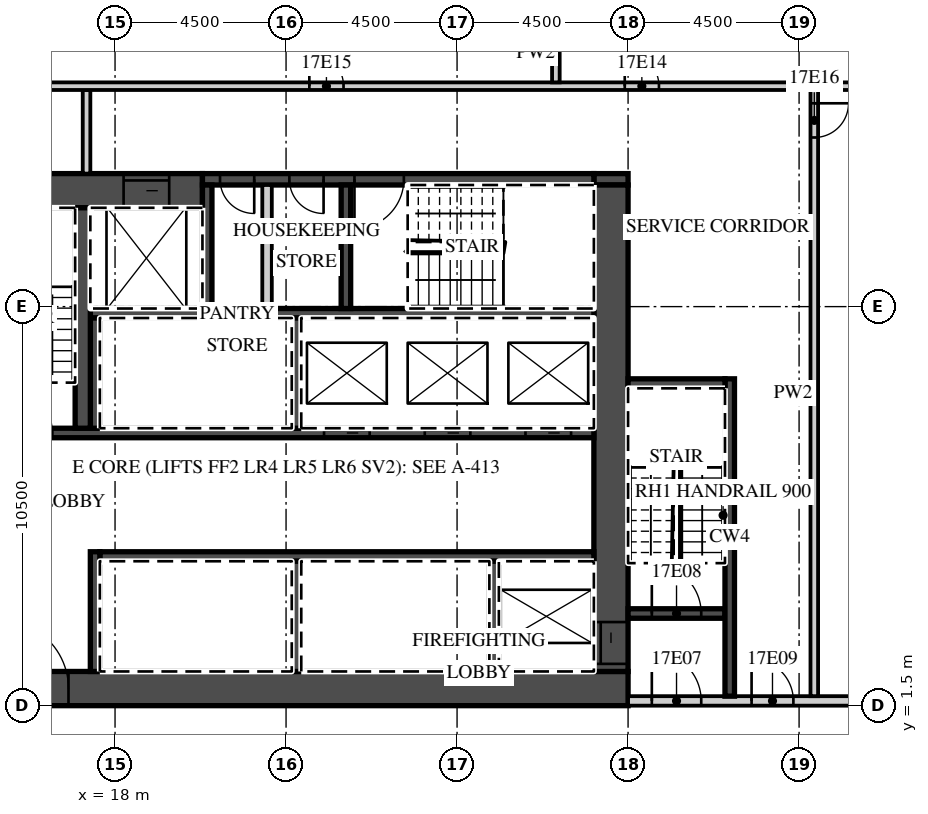
"""IFC4 building model, lengths in metres.
Left out: names, types, materials, properties, quantities, classifications, styles, units other than length and angle.
Written with IfcOpenShell. Run it as: python <this file> out.ifc"""

import sys

from ifc_helpers import new_model, si_unit, direction, frame, frame_2d, origin, place, context, subcontext, project, spatial, rectangle, extrude, element, fill, save


model = new_model("IFC4")
c1 = context("Model", 3, precision=1e-05, world=origin(), true_north=direction((0.0, 1.0)))
c2 = subcontext(c1, "Body", "Model", "MODEL_VIEW")
j1 = project(units=[si_unit("LENGTHUNIT", "METRE"), si_unit("PLANEANGLEUNIT", "RADIAN")], contexts=[c1])
p1 = place(None, origin())
s1 = spatial("IfcSite", under=j1, at=p1, CompositionType="ELEMENT")
p2 = place(p1, origin())
s2 = spatial("IfcBuilding", under=s1, at=p2, CompositionType="ELEMENT")
p3 = place(p2, frame((0.0, 0.0, 86.4)))
s3 = spatial("IfcBuildingStorey", under=s2, at=p3, CompositionType="ELEMENT", Elevation=86.4)
p4 = place(p3, frame((13.5, 1.95, 0.0), z_axis=(0.0, 0.0, 1.0), x_axis=(1.0, 0.0, 0.0)))
e1 = element("IfcWall", 1, at=p4, inside=s3, PredefinedType="SHEAR", context=c2, shape_type="SweptSolid", body=[
    extrude(rectangle(XDim=18.0, YDim=0.9, at=frame_2d((9.0, 0.0))), origin(), (0.0, 0.0, 1.0), 3.02),
])
p5 = place(p4, frame((1.475, 0.0, 0.0)))
e2 = element("IfcOpeningElement", 2, at=p5, cuts=e1, PredefinedType="OPENING", context=c2, shape_type="SweptSolid", body=[
    extrude(rectangle(XDim=1.8, YDim=2.1, at=frame_2d((0.9, 1.05))), frame((0.0, 0.46, 0.0), z_axis=(0.0, -1.0, 0.0), x_axis=(1.0, 0.0, 0.0)), (0.0, 0.0, 1.0), 0.92),
])
p6 = place(p3, frame((13.5, 15.05, 0.0), z_axis=(0.0, 0.0, 1.0), x_axis=(1.0, 0.0, 0.0)))
e3 = element("IfcWall", 3, at=p6, inside=s3, PredefinedType="SHEAR", context=c2, shape_type="SweptSolid", body=[
    extrude(rectangle(XDim=6.8, YDim=0.9, at=frame_2d((3.4, 0.0))), origin(), (0.0, 0.0, 1.0), 3.02),
])
p7 = place(p6, frame((4.725, 0.0, 0.0)))
e4 = element("IfcOpeningElement", 4, at=p7, cuts=e3, PredefinedType="OPENING", context=c2, shape_type="SweptSolid", body=[
    extrude(rectangle(XDim=1.2, YDim=2.1, at=frame_2d((0.6, 1.05))), frame((0.0, 0.46, 0.0), z_axis=(0.0, -1.0, 0.0), x_axis=(1.0, 0.0, 0.0)), (0.0, 0.0, 1.0), 0.92),
])
p8 = place(p3, frame((30.6, 15.35, 0.0), z_axis=(0.0, 0.0, 1.0), x_axis=(1.0, 0.0, 0.0)))
e5 = element("IfcWall", 5, at=p8, inside=s3, PredefinedType="SHEAR", context=c2, shape_type="SweptSolid", body=[
    extrude(rectangle(XDim=0.9, YDim=0.3, at=frame_2d((0.45, 0.0))), origin(), (0.0, 0.0, 1.0), 3.02),
])
p9 = place(p3, frame((20.3, 15.35, 0.0), z_axis=(0.0, 0.0, 1.0), x_axis=(1.0, 0.0, 0.0)))
e6 = element("IfcWall", 6, at=p9, inside=s3, PredefinedType="SHEAR", context=c2, shape_type="SweptSolid", body=[
    extrude(rectangle(XDim=10.3, YDim=0.3, at=frame_2d((5.15, 0.0))), origin(), (0.0, 0.0, 1.0), 3.02),
])
p10 = place(p9, frame((4.0, 0.0, 0.0)))
e7 = element("IfcOpeningElement", 7, at=p10, cuts=e6, PredefinedType="OPENING", context=c2, shape_type="SweptSolid", body=[
    extrude(rectangle(XDim=1.3, YDim=2.1, at=frame_2d((0.65, 1.05))), frame((0.0, 0.16, 0.0), z_axis=(0.0, -1.0, 0.0), x_axis=(1.0, 0.0, 0.0)), (0.0, 0.0, 1.0), 0.32),
])
p11 = place(p9, frame((2.288, 0.0, 0.0)))
e8 = element("IfcOpeningElement", 8, at=p11, cuts=e6, PredefinedType="OPENING", context=c2, shape_type="SweptSolid", body=[
    extrude(rectangle(XDim=0.9, YDim=2.1, at=frame_2d((0.45, 1.05))), frame((0.0, 0.16, 0.0), z_axis=(0.0, -1.0, 0.0), x_axis=(1.0, 0.0, 0.0)), (0.0, 0.0, 1.0), 0.32),
])
p12 = place(p9, frame((0.462, 0.0, 0.0)))
e9 = element("IfcOpeningElement", 9, at=p12, cuts=e6, PredefinedType="OPENING", context=c2, shape_type="SweptSolid", body=[
    extrude(rectangle(XDim=0.9, YDim=2.1, at=frame_2d((0.45, 1.05))), frame((0.0, 0.16, 0.0), z_axis=(0.0, -1.0, 0.0), x_axis=(1.0, 0.0, 0.0)), (0.0, 0.0, 1.0), 0.32),
])
p13 = place(p3, frame((31.05, 2.4, 0.0), z_axis=(0.0, 0.0, 1.0), x_axis=(0.0, 1.0, 0.0)))
e10 = element("IfcWall", 10, at=p13, inside=s3, PredefinedType="SHEAR", context=c2, shape_type="SweptSolid", body=[
    extrude(rectangle(XDim=12.8, YDim=0.9, at=frame_2d((6.4, 0.0))), origin(), (0.0, 0.0, 1.0), 3.02),
])
p14 = place(p13, frame((0.2, 0.0, 0.0)))
e11 = element("IfcOpeningElement", 11, at=p14, cuts=e10, PredefinedType="OPENING", context=c2, shape_type="SweptSolid", body=[
    extrude(rectangle(XDim=1.1, YDim=2.1, at=frame_2d((0.55, 1.05))), frame((0.0, 0.46, 0.0), z_axis=(0.0, -1.0, 0.0), x_axis=(1.0, 0.0, 0.0)), (0.0, 0.0, 1.0), 0.92),
])
p15 = place(p3, frame((17.6, 5.425, 0.0), z_axis=(0.0, 0.0, 1.0), x_axis=(1.0, 0.0, 0.0)))
e12 = element("IfcWall", 12, at=p15, inside=s3, PredefinedType="SHEAR", context=c2, shape_type="SweptSolid", body=[
    extrude(rectangle(XDim=13.0, YDim=0.25, at=frame_2d((6.5, 0.0))), origin(), (0.0, 0.0, 1.0), 3.02),
])
p16 = place(p3, frame((17.475, 2.4, 0.0), z_axis=(0.0, 0.0, 1.0), x_axis=(0.0, 1.0, 0.0)))
e13 = element("IfcWall", 13, at=p16, inside=s3, PredefinedType="SHEAR", context=c2, shape_type="SweptSolid", body=[
    extrude(rectangle(XDim=3.15, YDim=0.25, at=frame_2d((1.575, 0.0))), origin(), (0.0, 0.0, 1.0), 3.02),
])
for number, where, z_axis, x_axis in (
    (14, (27.975, 2.4, 0.0), (0.0, 0.0, 1.0), (0.0, 1.0, 0.0)),
    (15, (22.775, 2.4, 0.0), (0.0, 0.0, 1.0), (0.0, 1.0, 0.0)),
):
    element("IfcWall", number, at=place(p3, frame(where, z_axis=z_axis, x_axis=x_axis)), inside=s3, PredefinedType="SHEAR", context=c2, shape_type="SweptSolid", body=[
        extrude(rectangle(XDim=2.9, YDim=0.25, at=frame_2d((1.45, 0.0))), origin(), (0.0, 0.0, 1.0), 3.02),
    ])
p17 = place(p3, frame((14.4, 8.675, 0.0), z_axis=(0.0, 0.0, 1.0), x_axis=(1.0, 0.0, 0.0)))
e16 = element("IfcWall", 16, at=p17, inside=s3, PredefinedType="SHEAR", context=c2, shape_type="SweptSolid", body=[
    extrude(rectangle(XDim=16.2, YDim=0.25, at=frame_2d((8.1, 0.0))), origin(), (0.0, 0.0, 1.0), 3.02),
])
p18 = place(p17, frame((14.4, 0.0, 0.0)))
e17 = element("IfcOpeningElement", 17, at=p18, cuts=e16, PredefinedType="OPENING", context=c2, shape_type="SweptSolid", body=[
    extrude(rectangle(XDim=1.2, YDim=2.1, at=frame_2d((0.6, 1.05))), frame((0.0, 0.135, 0.0), z_axis=(0.0, -1.0, 0.0), x_axis=(1.0, 0.0, 0.0)), (0.0, 0.0, 1.0), 0.27),
])
p19 = place(p17, frame((11.75, 0.0, 0.0)))
e18 = element("IfcOpeningElement", 18, at=p19, cuts=e16, PredefinedType="OPENING", context=c2, shape_type="SweptSolid", body=[
    extrude(rectangle(XDim=1.2, YDim=2.1, at=frame_2d((0.6, 1.05))), frame((0.0, 0.135, 0.0), z_axis=(0.0, -1.0, 0.0), x_axis=(1.0, 0.0, 0.0)), (0.0, 0.0, 1.0), 0.27),
])
p20 = place(p17, frame((9.1, 0.0, 0.0)))
e19 = element("IfcOpeningElement", 19, at=p20, cuts=e16, PredefinedType="OPENING", context=c2, shape_type="SweptSolid", body=[
    extrude(rectangle(XDim=1.2, YDim=2.1, at=frame_2d((0.6, 1.05))), frame((0.0, 0.135, 0.0), z_axis=(0.0, -1.0, 0.0), x_axis=(1.0, 0.0, 0.0)), (0.0, 0.0, 1.0), 0.27),
])
p21 = place(p17, frame((0.65, 0.0, 0.0)))
e20 = element("IfcOpeningElement", 20, at=p21, cuts=e16, PredefinedType="OPENING", context=c2, shape_type="SweptSolid", body=[
    extrude(rectangle(XDim=1.3, YDim=2.1, at=frame_2d((0.65, 1.05))), frame((0.0, 0.135, 0.0), z_axis=(0.0, -1.0, 0.0), x_axis=(1.0, 0.0, 0.0)), (0.0, 0.0, 1.0), 0.27),
])
p22 = place(p3, frame((17.35, 11.825, 0.0), z_axis=(0.0, 0.0, 1.0), x_axis=(1.0, 0.0, 0.0)))
e21 = element("IfcWall", 21, at=p22, inside=s3, PredefinedType="SHEAR", context=c2, shape_type="SweptSolid", body=[
    extrude(rectangle(XDim=13.25, YDim=0.25, at=frame_2d((6.625, 0.0))), origin(), (0.0, 0.0, 1.0), 3.02),
])
for number, where, z_axis, x_axis in (
    (22, (17.475, 8.8, 0.0), (0.0, 0.0, 1.0), (0.0, 1.0, 0.0)),
    (23, (22.775, 8.8, 0.0), (0.0, 0.0, 1.0), (0.0, 1.0, 0.0)),
):
    element("IfcWall", number, at=place(p3, frame(where, z_axis=z_axis, x_axis=x_axis)), inside=s3, PredefinedType="SHEAR", context=c2, shape_type="SweptSolid", body=[
        extrude(rectangle(XDim=2.9, YDim=0.25, at=frame_2d((1.45, 0.0))), origin(), (0.0, 0.0, 1.0), 3.02),
    ])
p23 = place(p3, frame((17.15, 8.8, 0.0), z_axis=(0.0, 0.0, 1.0), x_axis=(0.0, 1.0, 0.0)))
e24 = element("IfcWall", 24, at=p23, inside=s3, PredefinedType="SHEAR", context=c2, shape_type="SweptSolid", body=[
    extrude(rectangle(XDim=5.8, YDim=0.4, at=frame_2d((2.9, 0.0))), origin(), (0.0, 0.0, 1.0), 3.02),
])
for number, where, z_axis, x_axis in (
    (25, (20.425, 11.95, 0.0), (0.0, 0.0, 1.0), (0.0, 1.0, 0.0)),
    (26, (24.075, 11.95, 0.0), (0.0, 0.0, 1.0), (0.0, 1.0, 0.0)),
):
    element("IfcWall", number, at=place(p3, frame(where, z_axis=z_axis, x_axis=x_axis)), inside=s3, PredefinedType="SHEAR", context=c2, shape_type="SweptSolid", body=[
        extrude(rectangle(XDim=3.25, YDim=0.25, at=frame_2d((1.625, 0.0))), origin(), (0.0, 0.0, 1.0), 3.02),
    ])
p24 = place(p3, frame((22.0, 11.95, 0.0), z_axis=(0.0, 0.0, 1.0), x_axis=(0.0, 1.0, 0.0)))
e27 = element("IfcWall", 27, at=p24, inside=s3, PredefinedType="PARTITIONING", context=c2, shape_type="SweptSolid", body=[
    extrude(rectangle(XDim=3.25, YDim=0.25, at=frame_2d((1.625, 0.0))), origin(), (0.0, 0.0, 1.0), 3.02),
])
p25 = place(p3, frame((31.5, 1.625, 0.0), z_axis=(0.0, 0.0, 1.0), x_axis=(1.0, 0.0, 0.0)))
e28 = element("IfcWall", 28, at=p25, inside=s3, PredefinedType="PARTITIONING", context=c2, shape_type="SweptSolid", body=[
    extrude(rectangle(XDim=13.05, YDim=0.25, at=frame_2d((6.525, 0.0))), origin(), (0.0, 0.0, 1.0), 3.02),
])
p26 = place(p25, frame((0.625, 0.0, 0.0)))
e29 = element("IfcOpeningElement", 29, at=p26, cuts=e28, PredefinedType="OPENING", context=c2, shape_type="SweptSolid", body=[
    extrude(rectangle(XDim=1.3, YDim=2.1, at=frame_2d((0.65, 1.05))), frame((0.0, 0.135, 0.0), z_axis=(0.0, -1.0, 0.0), x_axis=(1.0, 0.0, 0.0)), (0.0, 0.0, 1.0), 0.27),
])
p27 = place(p25, frame((3.25, 0.0, 0.0)))
e30 = element("IfcOpeningElement", 30, at=p27, cuts=e28, PredefinedType="OPENING", context=c2, shape_type="SweptSolid", body=[
    extrude(rectangle(XDim=1.1, YDim=2.1, at=frame_2d((0.55, 1.05))), frame((0.0, 0.135, 0.0), z_axis=(0.0, -1.0, 0.0), x_axis=(1.0, 0.0, 0.0)), (0.0, 0.0, 1.0), 0.27),
])
p28 = place(p3, frame((31.5, 3.925, 0.0), z_axis=(0.0, 0.0, 1.0), x_axis=(1.0, 0.0, 0.0)))
e31 = element("IfcWall", 31, at=p28, inside=s3, PredefinedType="SHEAR", context=c2, shape_type="SweptSolid", body=[
    extrude(rectangle(XDim=2.55, YDim=0.25, at=frame_2d((1.275, 0.0))), origin(), (0.0, 0.0, 1.0), 3.02),
])
p29 = place(p28, frame((0.625, 0.0, 0.0)))
e32 = element("IfcOpeningElement", 32, at=p29, cuts=e31, PredefinedType="OPENING", context=c2, shape_type="SweptSolid", body=[
    extrude(rectangle(XDim=1.3, YDim=2.1, at=frame_2d((0.65, 1.05))), frame((0.0, 0.135, 0.0), z_axis=(0.0, -1.0, 0.0), x_axis=(1.0, 0.0, 0.0)), (0.0, 0.0, 1.0), 0.27),
])
p30 = place(p3, frame((34.175, 1.75, 0.0), z_axis=(0.0, 0.0, 1.0), x_axis=(0.0, 1.0, 0.0)))
e33 = element("IfcWall", 33, at=p30, inside=s3, PredefinedType="SHEAR", context=c2, shape_type="SweptSolid", body=[
    extrude(rectangle(XDim=8.35, YDim=0.25, at=frame_2d((4.175, 0.0))), origin(), (0.0, 0.0, 1.0), 3.02),
])
p31 = place(p3, frame((31.5, 9.975, 0.0), z_axis=(0.0, 0.0, 1.0), x_axis=(1.0, 0.0, 0.0)))
e34 = element("IfcWall", 34, at=p31, inside=s3, PredefinedType="SHEAR", context=c2, shape_type="SweptSolid", body=[
    extrude(rectangle(XDim=2.55, YDim=0.25, at=frame_2d((1.275, 0.0))), origin(), (0.0, 0.0, 1.0), 3.02),
])
p32 = place(p3, frame((17.25, 15.5, 0.0), z_axis=(0.0, 0.0, 1.0), x_axis=(0.0, 1.0, 0.0)))
e35 = element("IfcWall", 35, at=p32, inside=s3, PredefinedType="PARTITIONING", context=c2, shape_type="SweptSolid", body=[
    extrude(rectangle(XDim=2.2, YDim=0.2, at=frame_2d((1.1, 0.0))), origin(), (0.0, 0.0, 1.0), 3.02),
])
p33 = place(p3, frame((36.4, 1.75, 0.0), z_axis=(0.0, 0.0, 1.0), x_axis=(0.0, 1.0, 0.0)))
e36 = element("IfcWall", 36, at=p33, inside=s3, PredefinedType="PARTITIONING", context=c2, shape_type="SweptSolid", body=[
    extrude(rectangle(XDim=15.95, YDim=0.2, at=frame_2d((7.975, 0.0))), origin(), (0.0, 0.0, 1.0), 3.02),
])
p34 = place(p33, frame((14.7, 0.0, 0.0)))
e37 = element("IfcOpeningElement", 37, at=p34, cuts=e36, PredefinedType="OPENING", context=c2, shape_type="SweptSolid", body=[
    extrude(rectangle(XDim=0.9, YDim=2.1, at=frame_2d((0.45, 1.05))), frame((0.0, 0.11, 0.0), z_axis=(0.0, -1.0, 0.0), x_axis=(1.0, 0.0, 0.0)), (0.0, 0.0, 1.0), 0.22),
])
p35 = place(p3, frame((13.6, 17.8, 0.0), z_axis=(0.0, 0.0, 1.0), x_axis=(1.0, 0.0, 0.0)))
e38 = element("IfcWall", 38, at=p35, inside=s3, PredefinedType="PARTITIONING", context=c2, shape_type="SweptSolid", body=[
    extrude(rectangle(XDim=30.95, YDim=0.2, at=frame_2d((15.475, 0.0))), origin(), (0.0, 0.0, 1.0), 3.02),
])
p36 = place(p35, frame((17.812, 0.0, 0.0)))
e39 = element("IfcOpeningElement", 39, at=p36, cuts=e38, PredefinedType="OPENING", context=c2, shape_type="SweptSolid", body=[
    extrude(rectangle(XDim=0.9, YDim=2.1, at=frame_2d((0.45, 1.05))), frame((0.0, 0.11, 0.0), z_axis=(0.0, -1.0, 0.0), x_axis=(1.0, 0.0, 0.0)), (0.0, 0.0, 1.0), 0.22),
])
p37 = place(p35, frame((9.512, 0.0, 0.0)))
e40 = element("IfcOpeningElement", 40, at=p37, cuts=e38, PredefinedType="OPENING", context=c2, shape_type="SweptSolid", body=[
    extrude(rectangle(XDim=0.9, YDim=2.1, at=frame_2d((0.45, 1.05))), frame((0.0, 0.11, 0.0), z_axis=(0.0, -1.0, 0.0), x_axis=(1.0, 0.0, 0.0)), (0.0, 0.0, 1.0), 0.22),
])
p38 = place(p3, frame((29.6, 17.9, 0.0), z_axis=(0.0, 0.0, 1.0), x_axis=(0.0, 1.0, 0.0)))
e41 = element("IfcWall", 41, at=p38, inside=s3, PredefinedType="PARTITIONING", context=c2, shape_type="SweptSolid", body=[
    extrude(rectangle(XDim=3.65, YDim=0.2, at=frame_2d((1.825, 0.0))), origin(), (0.0, 0.0, 1.0), 3.02),
])
p39 = place(p18, origin())
e42 = element("IfcDoor", 42, at=p39, inside=s3, OperationType="SLIDING_TO_LEFT", PredefinedType="DOOR", context=c2, shape_type="SweptSolid", body=[
    extrude(rectangle(XDim=1.2, YDim=2.1, at=frame_2d((0.6, 1.05))), frame((0.0, 0.025, 0.0), z_axis=(0.0, -1.0, 0.0), x_axis=(1.0, 0.0, 0.0)), (0.0, 0.0, 1.0), 0.05),
])
fill(e17, e42)
p40 = place(p19, origin())
e43 = element("IfcDoor", 43, at=p40, inside=s3, OperationType="SLIDING_TO_RIGHT", PredefinedType="DOOR", context=c2, shape_type="SweptSolid", body=[
    extrude(rectangle(XDim=1.2, YDim=2.1, at=frame_2d((0.6, 1.05))), frame((0.0, 0.025, 0.0), z_axis=(0.0, -1.0, 0.0), x_axis=(1.0, 0.0, 0.0)), (0.0, 0.0, 1.0), 0.05),
])
fill(e18, e43)
p41 = place(p20, origin())
e44 = element("IfcDoor", 44, at=p41, inside=s3, OperationType="SLIDING_TO_RIGHT", PredefinedType="DOOR", context=c2, shape_type="SweptSolid", body=[
    extrude(rectangle(XDim=1.2, YDim=2.1, at=frame_2d((0.6, 1.05))), frame((0.0, 0.025, 0.0), z_axis=(0.0, -1.0, 0.0), x_axis=(1.0, 0.0, 0.0)), (0.0, 0.0, 1.0), 0.05),
])
fill(e19, e44)
p42 = place(p7, origin())
e45 = element("IfcDoor", 45, at=p42, inside=s3, OperationType="SLIDING_TO_LEFT", PredefinedType="DOOR", context=c2, shape_type="SweptSolid", body=[
    extrude(rectangle(XDim=1.2, YDim=2.1, at=frame_2d((0.6, 1.05))), frame((0.0, 0.025, 0.0), z_axis=(0.0, -1.0, 0.0), x_axis=(1.0, 0.0, 0.0)), (0.0, 0.0, 1.0), 0.05),
])
fill(e4, e45)
p43 = place(p14, origin())
e46 = element("IfcDoor", 46, at=p43, inside=s3, OperationType="SLIDING_TO_LEFT", PredefinedType="DOOR", context=c2, shape_type="SweptSolid", body=[
    extrude(rectangle(XDim=1.1, YDim=2.1, at=frame_2d((0.55, 1.05))), frame((0.0, 0.025, 0.0), z_axis=(0.0, -1.0, 0.0), x_axis=(1.0, 0.0, 0.0)), (0.0, 0.0, 1.0), 0.05),
])
fill(e11, e46)
p44 = place(p5, origin())
e47 = element("IfcDoor", 47, at=p44, inside=s3, OperationType="DOUBLE_DOOR_DOUBLE_SWING", PredefinedType="DOOR", context=c2, shape_type="SweptSolid", body=[
    extrude(rectangle(XDim=1.8, YDim=2.1, at=frame_2d((0.9, 1.05))), frame((0.0, 0.025, 0.0), z_axis=(0.0, -1.0, 0.0), x_axis=(1.0, 0.0, 0.0)), (0.0, 0.0, 1.0), 0.05),
])
fill(e2, e47)
p45 = place(p26, origin())
e48 = element("IfcDoor", 48, at=p45, inside=s3, OperationType="SINGLE_SWING_LEFT", PredefinedType="DOOR", context=c2, shape_type="SweptSolid", body=[
    extrude(rectangle(XDim=1.3, YDim=2.1, at=frame_2d((0.65, 1.05))), frame((0.0, 0.025, 0.0), z_axis=(0.0, -1.0, 0.0), x_axis=(1.0, 0.0, 0.0)), (0.0, 0.0, 1.0), 0.05),
])
fill(e29, e48)
p46 = place(p29, origin())
e49 = element("IfcDoor", 49, at=p46, inside=s3, OperationType="SINGLE_SWING_LEFT", PredefinedType="DOOR", context=c2, shape_type="SweptSolid", body=[
    extrude(rectangle(XDim=1.3, YDim=2.1, at=frame_2d((0.65, 1.05))), frame((0.0, 0.025, 0.0), z_axis=(0.0, -1.0, 0.0), x_axis=(1.0, 0.0, 0.0)), (0.0, 0.0, 1.0), 0.05),
])
fill(e32, e49)
p47 = place(p27, origin())
e50 = element("IfcDoor", 50, at=p47, inside=s3, OperationType="SINGLE_SWING_LEFT", PredefinedType="DOOR", context=c2, shape_type="SweptSolid", body=[
    extrude(rectangle(XDim=1.1, YDim=2.1, at=frame_2d((0.55, 1.05))), frame((0.0, 0.025, 0.0), z_axis=(0.0, -1.0, 0.0), x_axis=(1.0, 0.0, 0.0)), (0.0, 0.0, 1.0), 0.05),
])
fill(e30, e50)
p48 = place(p10, origin())
e51 = element("IfcDoor", 51, at=p48, inside=s3, OperationType="SINGLE_SWING_LEFT", PredefinedType="DOOR", context=c2, shape_type="SweptSolid", body=[
    extrude(rectangle(XDim=1.3, YDim=2.1, at=frame_2d((0.65, 1.05))), frame((0.0, 0.025, 0.0), z_axis=(0.0, -1.0, 0.0), x_axis=(1.0, 0.0, 0.0)), (0.0, 0.0, 1.0), 0.05),
])
fill(e7, e51)
p49 = place(p11, origin())
e52 = element("IfcDoor", 52, at=p49, inside=s3, OperationType="SINGLE_SWING_RIGHT", PredefinedType="DOOR", context=c2, shape_type="SweptSolid", body=[
    extrude(rectangle(XDim=0.9, YDim=2.1, at=frame_2d((0.45, 1.05))), frame((0.0, 0.025, 0.0), z_axis=(0.0, -1.0, 0.0), x_axis=(1.0, 0.0, 0.0)), (0.0, 0.0, 1.0), 0.05),
])
fill(e8, e52)
p50 = place(p12, origin())
e53 = element("IfcDoor", 53, at=p50, inside=s3, OperationType="SINGLE_SWING_RIGHT", PredefinedType="DOOR", context=c2, shape_type="SweptSolid", body=[
    extrude(rectangle(XDim=0.9, YDim=2.1, at=frame_2d((0.45, 1.05))), frame((0.0, 0.025, 0.0), z_axis=(0.0, -1.0, 0.0), x_axis=(1.0, 0.0, 0.0)), (0.0, 0.0, 1.0), 0.05),
])
fill(e9, e53)
p51 = place(p36, origin())
e54 = element("IfcDoor", 54, at=p51, inside=s3, OperationType="SINGLE_SWING_LEFT", PredefinedType="DOOR", context=c2, shape_type="SweptSolid", body=[
    extrude(rectangle(XDim=0.9, YDim=2.1, at=frame_2d((0.45, 1.05))), frame((0.0, 0.025, 0.0), z_axis=(0.0, -1.0, 0.0), x_axis=(1.0, 0.0, 0.0)), (0.0, 0.0, 1.0), 0.05),
])
fill(e39, e54)
p52 = place(p37, origin())
e55 = element("IfcDoor", 55, at=p52, inside=s3, OperationType="SINGLE_SWING_LEFT", PredefinedType="DOOR", context=c2, shape_type="SweptSolid", body=[
    extrude(rectangle(XDim=0.9, YDim=2.1, at=frame_2d((0.45, 1.05))), frame((0.0, 0.025, 0.0), z_axis=(0.0, -1.0, 0.0), x_axis=(1.0, 0.0, 0.0)), (0.0, 0.0, 1.0), 0.05),
])
fill(e40, e55)
p53 = place(p34, origin())
e56 = element("IfcDoor", 56, at=p53, inside=s3, OperationType="SINGLE_SWING_RIGHT", PredefinedType="DOOR", context=c2, shape_type="SweptSolid", body=[
    extrude(rectangle(XDim=0.9, YDim=2.1, at=frame_2d((0.45, 1.05))), frame((0.0, 0.025, 0.0), z_axis=(0.0, -1.0, 0.0), x_axis=(1.0, 0.0, 0.0)), (0.0, 0.0, 1.0), 0.05),
])
fill(e37, e56)
save(model, sys.argv[1])
